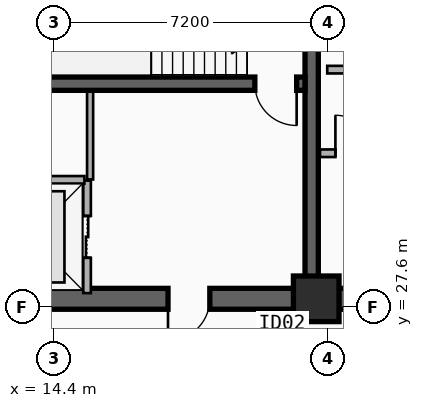
"""IFC4 building model, lengths in metres.
Left out: names, types, materials, properties, quantities, classifications, styles, units other than length and angle.
Written with IfcOpenShell. Run it as: python <this file> out.ifc"""

import sys

from ifc_helpers import new_model, si_unit, direction, frame, frame_2d, origin, origin_2d, place, context, subcontext, project, spatial, rectangle, extrude, element, fill, save


model = new_model("IFC4")
c1 = context("Model", 3, precision=1e-05, world=origin(), true_north=direction((0.0, 1.0)))
c2 = subcontext(c1, "Body", "Model", "MODEL_VIEW")
j1 = project(units=[si_unit("LENGTHUNIT", "METRE"), si_unit("PLANEANGLEUNIT", "RADIAN")], contexts=[c1])
p1 = place(None, origin())
s1 = spatial("IfcSite", under=j1, at=p1, CompositionType="ELEMENT")
p2 = place(p1, origin())
s2 = spatial("IfcBuilding", under=s1, at=p2, CompositionType="ELEMENT")
p3 = place(p2, frame((0.0, 0.0, 173.2)))
s3 = spatial("IfcBuildingStorey", under=s2, at=p3, CompositionType="ELEMENT", Elevation=173.2)
p4 = place(p3, frame((21.18, 27.82, 0.0), z_axis=(0.0, 0.0, 1.0), x_axis=(-1.0, 0.0, 0.0)))
e1 = element("IfcWall", 1, at=p4, inside=s3, PredefinedType="SHEAR", context=c2, shape_type="SweptSolid", body=[
    extrude(rectangle(XDim=9.03, YDim=0.55, at=frame_2d((4.515, 0.0))), origin(), (0.0, 0.0, 1.0), 3.55),
])
p5 = place(p4, frame((2.68, 0.0, 0.0)))
e2 = element("IfcOpeningElement", 2, at=p5, cuts=e1, PredefinedType="OPENING", context=c2, shape_type="SweptSolid", body=[
    extrude(rectangle(XDim=1.1, YDim=2.15, at=frame_2d((0.55, 1.075))), frame((0.0, 0.285, 0.0), z_axis=(0.0, -1.0, 0.0), x_axis=(1.0, 0.0, 0.0)), (0.0, 0.0, 1.0), 0.57),
])
p6 = place(p3, frame((33.15, 27.82, 0.0), z_axis=(0.0, 0.0, 1.0), x_axis=(-1.0, 0.0, 0.0)))
e3 = element("IfcWall", 3, at=p6, inside=s3, PredefinedType="SHEAR", context=c2, shape_type="SweptSolid", body=[
    extrude(rectangle(XDim=11.97, YDim=0.55, at=frame_2d((5.985, 0.0))), origin(), (0.0, 0.0, 1.0), 3.55),
])
p7 = place(p6, frame((6.1, 0.0, 0.0)))
e4 = element("IfcOpeningElement", 4, at=p7, cuts=e3, PredefinedType="OPENING", context=c2, shape_type="SweptSolid", body=[
    extrude(rectangle(XDim=1.6, YDim=2.2, at=frame_2d((0.8, 1.1))), frame((0.0, 0.285, 0.0), z_axis=(0.0, -1.0, 0.0), x_axis=(1.0, 0.0, 0.0)), (0.0, 0.0, 1.0), 0.57),
])
p8 = place(p3, frame((21.18, 28.095, 0.0), z_axis=(0.0, 0.0, 1.0), x_axis=(0.0, 1.0, 0.0)))
e5 = element("IfcWall", 5, at=p8, inside=s3, PredefinedType="SHEAR", context=c2, shape_type="SweptSolid", body=[
    extrude(rectangle(XDim=8.68, YDim=0.35, at=frame_2d((4.34, 0.0))), origin(), (0.0, 0.0, 1.0), 3.55),
])
p9 = place(p3, frame((21.005, 33.48, 0.0), z_axis=(0.0, 0.0, 1.0), x_axis=(-1.0, 0.0, 0.0)))
e6 = element("IfcWall", 6, at=p9, inside=s3, PredefinedType="SHEAR", context=c2, shape_type="SweptSolid", body=[
    extrude(rectangle(XDim=8.58, YDim=0.35, at=frame_2d((4.29, 0.0))), origin(), (0.0, 0.0, 1.0), 3.55),
])
p10 = place(p9, frame((0.22, 0.0, 0.0)))
e7 = element("IfcOpeningElement", 7, at=p10, cuts=e6, PredefinedType="OPENING", context=c2, shape_type="SweptSolid", body=[
    extrude(rectangle(XDim=1.1, YDim=2.15, at=frame_2d((0.55, 1.075))), frame((0.0, 0.185, 0.0), z_axis=(0.0, -1.0, 0.0), x_axis=(1.0, 0.0, 0.0)), (0.0, 0.0, 1.0), 0.37),
])
p11 = place(p3, frame((21.3, 27.82, 0.0), z_axis=(0.0, 0.0, 1.0), x_axis=(1.0, 0.0, 0.0)))
e8 = element("IfcColumn", 8, at=p11, inside=s3, PredefinedType="COLUMN", context=c2, shape_type="SweptSolid", body=[
    extrude(rectangle(XDim=1.2, YDim=1.2, at=origin_2d()), origin(), (0.0, 0.0, 1.0), 3.55),
])
p12 = place(p3, frame((15.27, 27.97, 0.0), z_axis=(0.0, 0.0, 1.0), x_axis=(0.0, 1.0, 0.0)))
e9 = element("IfcWall", 9, at=p12, inside=s3, PredefinedType="PARTITIONING", context=c2, shape_type="SweptSolid", body=[
    extrude(rectangle(XDim=2.96, YDim=0.2, at=frame_2d((1.48, 0.0))), origin(), (0.0, 0.0, 1.0), 2.36),
])
p13 = place(p12, frame((0.93, 0.0, 0.0)))
e10 = element("IfcOpeningElement", 10, at=p13, cuts=e9, PredefinedType="OPENING", context=c2, shape_type="SweptSolid", body=[
    extrude(rectangle(XDim=1.1, YDim=2.15, at=frame_2d((0.55, 1.075))), frame((0.0, 0.11, 0.0), z_axis=(0.0, -1.0, 0.0), x_axis=(1.0, 0.0, 0.0)), (0.0, 0.0, 1.0), 0.22),
])
p14 = place(p3, frame((12.45, 30.95, 0.0), z_axis=(0.0, 0.0, 1.0), x_axis=(1.0, 0.0, 0.0)))
e11 = element("IfcWall", 11, at=p14, inside=s3, PredefinedType="PARTITIONING", context=c2, shape_type="SweptSolid", body=[
    extrude(rectangle(XDim=2.75, YDim=0.2, at=frame_2d((1.375, 0.0))), origin(), (0.0, 0.0, 1.0), 2.36),
])
p15 = place(p3, frame((21.4, 31.65, 0.0), z_axis=(0.0, 0.0, 1.0), x_axis=(1.0, 0.0, 0.0)))
e12 = element("IfcWall", 12, at=p15, inside=s3, PredefinedType="PARTITIONING", context=c2, shape_type="SweptSolid", body=[
    extrude(rectangle(XDim=1.81, YDim=0.2, at=frame_2d((0.905, 0.0))), origin(), (0.0, 0.0, 1.0), 2.36),
])
p16 = place(p15, frame((0.405, 0.0, 0.0)))
e13 = element("IfcOpeningElement", 13, at=p16, cuts=e12, PredefinedType="OPENING", context=c2, shape_type="SweptSolid", body=[
    extrude(rectangle(XDim=1.0, YDim=2.15, at=frame_2d((0.5, 1.075))), frame((0.0, 0.11, 0.0), z_axis=(0.0, -1.0, 0.0), x_axis=(1.0, 0.0, 0.0)), (0.0, 0.0, 1.0), 0.22),
])
p17 = place(p3, frame((21.59, 33.85, 0.0), z_axis=(0.0, 0.0, 1.0), x_axis=(1.0, 0.0, 0.0)))
e14 = element("IfcWall", 14, at=p17, inside=s3, PredefinedType="PARTITIONING", context=c2, shape_type="SweptSolid", body=[
    extrude(rectangle(XDim=5.92, YDim=0.2, at=frame_2d((2.96, 0.0))), origin(), (0.0, 0.0, 1.0), 2.36),
])
p18 = place(p17, frame((2.36, 0.0, 0.0)))
e15 = element("IfcOpeningElement", 15, at=p18, cuts=e14, PredefinedType="OPENING", context=c2, shape_type="SweptSolid", body=[
    extrude(rectangle(XDim=1.2, YDim=2.15, at=frame_2d((0.6, 1.075))), frame((0.0, 0.11, 0.0), z_axis=(0.0, -1.0, 0.0), x_axis=(1.0, 0.0, 0.0)), (0.0, 0.0, 1.0), 0.22),
])
p19 = place(p3, frame((15.35, 30.96, 0.0), z_axis=(0.0, 0.0, 1.0), x_axis=(0.0, 1.0, 0.0)))
e16 = element("IfcWall", 16, at=p19, inside=s3, PredefinedType="PARTITIONING", context=c2, shape_type="SweptSolid", body=[
    extrude(rectangle(XDim=2.31, YDim=0.16, at=frame_2d((1.155, 0.0))), origin(), (0.0, 0.0, 1.0), 3.29),
])
p20 = place(p13, origin())
e17 = element("IfcDoor", 17, at=p20, inside=s3, OperationType="DOUBLE_DOOR_SLIDING", PredefinedType="DOOR", context=c2, shape_type="SweptSolid", body=[
    extrude(rectangle(XDim=1.1, YDim=2.15, at=frame_2d((0.55, 1.075))), frame((0.0, 0.025, 0.0), z_axis=(0.0, -1.0, 0.0), x_axis=(1.0, 0.0, 0.0)), (0.0, 0.0, 1.0), 0.05),
])
fill(e10, e17)
p21 = place(p10, origin())
e18 = element("IfcDoor", 18, at=p21, inside=s3, OperationType="SINGLE_SWING_LEFT", PredefinedType="DOOR", context=c2, shape_type="SweptSolid", body=[
    extrude(rectangle(XDim=1.1, YDim=2.15, at=frame_2d((0.55, 1.075))), frame((0.0, 0.025, 0.0), z_axis=(0.0, -1.0, 0.0), x_axis=(1.0, 0.0, 0.0)), (0.0, 0.0, 1.0), 0.05),
])
fill(e7, e18)
p22 = place(p5, origin())
e19 = element("IfcDoor", 19, at=p22, inside=s3, OperationType="SINGLE_SWING_RIGHT", PredefinedType="DOOR", context=c2, shape_type="SweptSolid", body=[
    extrude(rectangle(XDim=1.1, YDim=2.15, at=frame_2d((0.55, 1.075))), frame((0.0, 0.025, 0.0), z_axis=(0.0, -1.0, 0.0), x_axis=(1.0, 0.0, 0.0)), (0.0, 0.0, 1.0), 0.05),
])
fill(e2, e19)
p23 = place(p16, origin())
e20 = element("IfcDoor", 20, at=p23, inside=s3, OperationType="SINGLE_SWING_LEFT", PredefinedType="DOOR", context=c2, shape_type="SweptSolid", body=[
    extrude(rectangle(XDim=1.0, YDim=2.15, at=frame_2d((0.5, 1.075))), frame((0.0, 0.025, 0.0), z_axis=(0.0, -1.0, 0.0), x_axis=(1.0, 0.0, 0.0)), (0.0, 0.0, 1.0), 0.05),
])
fill(e13, e20)
save(model, sys.argv[1])
